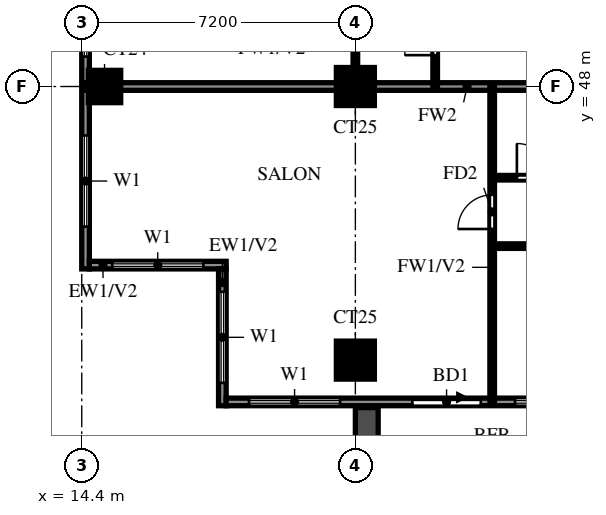
"""IFC4 building model, lengths in metres.
Left out: names, types, materials, properties, quantities, classifications, styles, units other than length and angle.
Written with IfcOpenShell. Run it as: python <this file> out.ifc"""

import sys

from ifc_helpers import new_model, si_unit, direction, frame, frame_2d, origin, origin_2d, place, context, subcontext, project, spatial, rectangle, extrude, source, transform, mapped, element, fill, save


model = new_model("IFC4")
c1 = context("Model", 3, precision=1e-05, world=origin(), true_north=direction((0.0, 1.0)))
c2 = subcontext(c1, "Body", "Model", "MODEL_VIEW")
j1 = project(units=[si_unit("LENGTHUNIT", "METRE"), si_unit("PLANEANGLEUNIT", "RADIAN")], contexts=[c1])
p1 = place(None, origin())
s1 = spatial("IfcSite", under=j1, at=p1, CompositionType="ELEMENT")
p2 = place(p1, origin())
s2 = spatial("IfcBuilding", under=s1, at=p2, CompositionType="ELEMENT")
p3 = place(p2, frame((0.0, 0.0, 167.5)))
s3 = spatial("IfcBuildingStorey", under=s2, at=p3, CompositionType="ELEMENT", Elevation=167.5)
m1 = source(origin(), c2, "Body", "SweptSolid", [
    extrude(rectangle(XDim=1.0, YDim=1.0, at=origin_2d()), origin(), (0.0, 0.0, 1.0), 3.2),
])
p4 = place(p3, frame((21.6, 40.8, 0.0), z_axis=(0.0, 0.0, 1.0), x_axis=(1.0, 0.0, 0.0)))
e1 = element("IfcColumn", 1, at=p4, inside=s3, PredefinedType="COLUMN", context=c2, shape_type="MappedRepresentation", body=[
    mapped(m1, transform((0.0, 0.0, 0.0))),
])
m2 = source(origin(), c2, "Body", "SweptSolid", [
    extrude(rectangle(XDim=0.85, YDim=0.85, at=origin_2d()), origin(), (0.0, 0.0, 1.0), 3.2),
])
p5 = place(p3, frame((15.0, 48.0, 0.0), z_axis=(0.0, 0.0, 1.0), x_axis=(1.0, 0.0, 0.0)))
e2 = element("IfcColumn", 2, at=p5, inside=s3, PredefinedType="COLUMN", context=c2, shape_type="MappedRepresentation", body=[
    mapped(m2, transform((0.0, 0.0, 0.0))),
])
p6 = place(p3, frame((21.6, 48.0, 0.0), z_axis=(0.0, 0.0, 1.0), x_axis=(1.0, 0.0, 0.0)))
e3 = element("IfcColumn", 3, at=p6, inside=s3, PredefinedType="COLUMN", context=c2, shape_type="MappedRepresentation", body=[
    mapped(m1, transform((0.0, 0.0, 0.0))),
])
p7 = place(p3, frame((14.5, 76.6, 0.0), z_axis=(0.0, 0.0, 1.0), x_axis=(0.0, -1.0, 0.0)))
e4 = element("IfcWall", 4, at=p7, inside=s3, PredefinedType="SOLIDWALL", context=c2, shape_type="SweptSolid", body=[
    extrude(rectangle(XDim=33.4, YDim=0.2, at=frame_2d((16.7, 0.0))), origin(), (0.0, 0.0, 1.0), 3.2),
])
p8 = place(p7, frame((15.1, 0.0, 0.0)))
e5 = element("IfcOpeningElement", 5, at=p8, cuts=e4, PredefinedType="OPENING", context=c2, shape_type="SweptSolid", body=[
    extrude(rectangle(XDim=1.8, YDim=2.4, at=frame_2d((0.9, 1.2))), frame((0.0, 0.11, 0.0), z_axis=(0.0, -1.0, 0.0), x_axis=(1.0, 0.0, 0.0)), (0.0, 0.0, 1.0), 0.22),
])
p9 = place(p7, frame((29.887, 0.0, 0.6)))
e6 = element("IfcOpeningElement", 6, at=p9, cuts=e4, PredefinedType="OPENING", context=c2, shape_type="SweptSolid", body=[
    extrude(rectangle(XDim=2.4, YDim=2.4, at=frame_2d((1.2, 1.2))), frame((0.0, 0.11, 0.0), z_axis=(0.0, -1.0, 0.0), x_axis=(1.0, 0.0, 0.0)), (0.0, 0.0, 1.0), 0.22),
])
p10 = place(p7, frame((25.413, 0.0, 0.6)))
e7 = element("IfcOpeningElement", 7, at=p10, cuts=e4, PredefinedType="OPENING", context=c2, shape_type="SweptSolid", body=[
    extrude(rectangle(XDim=2.4, YDim=2.4, at=frame_2d((1.2, 1.2))), frame((0.0, 0.11, 0.0), z_axis=(0.0, -1.0, 0.0), x_axis=(1.0, 0.0, 0.0)), (0.0, 0.0, 1.0), 0.22),
])
p11 = place(p7, frame((22.938, 0.0, 1.5)))
e8 = element("IfcOpeningElement", 8, at=p11, cuts=e4, PredefinedType="OPENING", context=c2, shape_type="SweptSolid", body=[
    extrude(rectangle(XDim=0.9, YDim=0.9, at=frame_2d((0.45, 0.45))), frame((0.0, 0.11, 0.0), z_axis=(0.0, -1.0, 0.0), x_axis=(1.0, 0.0, 0.0)), (0.0, 0.0, 1.0), 0.22),
])
p12 = place(p7, frame((17.35, 0.0, 0.6)))
e9 = element("IfcOpeningElement", 9, at=p12, cuts=e4, PredefinedType="OPENING", context=c2, shape_type="SweptSolid", body=[
    extrude(rectangle(XDim=0.9, YDim=2.4, at=frame_2d((0.45, 1.2))), frame((0.0, 0.11, 0.0), z_axis=(0.0, -1.0, 0.0), x_axis=(1.0, 0.0, 0.0)), (0.0, 0.0, 1.0), 0.22),
])
p13 = place(p7, frame((19.113, 0.0, 0.6)))
e10 = element("IfcOpeningElement", 10, at=p13, cuts=e4, PredefinedType="OPENING", context=c2, shape_type="SweptSolid", body=[
    extrude(rectangle(XDim=1.8, YDim=2.4, at=frame_2d((0.9, 1.2))), frame((0.0, 0.11, 0.0), z_axis=(0.0, -1.0, 0.0), x_axis=(1.0, 0.0, 0.0)), (0.0, 0.0, 1.0), 0.22),
])
p14 = place(p7, frame((10.75, 0.0, 0.6)))
e11 = element("IfcOpeningElement", 11, at=p14, cuts=e4, PredefinedType="OPENING", context=c2, shape_type="SweptSolid", body=[
    extrude(rectangle(XDim=0.9, YDim=2.4, at=frame_2d((0.45, 1.2))), frame((0.0, 0.11, 0.0), z_axis=(0.0, -1.0, 0.0), x_axis=(1.0, 0.0, 0.0)), (0.0, 0.0, 1.0), 0.22),
])
p15 = place(p7, frame((12.512, 0.0, 0.6)))
e12 = element("IfcOpeningElement", 12, at=p15, cuts=e4, PredefinedType="OPENING", context=c2, shape_type="SweptSolid", body=[
    extrude(rectangle(XDim=1.2, YDim=2.4, at=frame_2d((0.6, 1.2))), frame((0.0, 0.11, 0.0), z_axis=(0.0, -1.0, 0.0), x_axis=(1.0, 0.0, 0.0)), (0.0, 0.0, 1.0), 0.22),
])
p16 = place(p7, frame((8.538, 0.0, 1.5)))
e13 = element("IfcOpeningElement", 13, at=p16, cuts=e4, PredefinedType="OPENING", context=c2, shape_type="SweptSolid", body=[
    extrude(rectangle(XDim=0.9, YDim=0.9, at=frame_2d((0.45, 0.45))), frame((0.0, 0.11, 0.0), z_axis=(0.0, -1.0, 0.0), x_axis=(1.0, 0.0, 0.0)), (0.0, 0.0, 1.0), 0.22),
])
p17 = place(p7, frame((3.812, 0.0, 0.6)))
e14 = element("IfcOpeningElement", 14, at=p17, cuts=e4, PredefinedType="OPENING", context=c2, shape_type="SweptSolid", body=[
    extrude(rectangle(XDim=2.4, YDim=2.4, at=frame_2d((1.2, 1.2))), frame((0.0, 0.11, 0.0), z_axis=(0.0, -1.0, 0.0), x_axis=(1.0, 0.0, 0.0)), (0.0, 0.0, 1.0), 0.22),
])
p18 = place(p7, frame((0.6, 0.0, 0.6)))
e15 = element("IfcOpeningElement", 15, at=p18, cuts=e4, PredefinedType="OPENING", context=c2, shape_type="SweptSolid", body=[
    extrude(rectangle(XDim=2.4, YDim=2.4, at=frame_2d((1.2, 1.2))), frame((0.0, 0.11, 0.0), z_axis=(0.0, -1.0, 0.0), x_axis=(1.0, 0.0, 0.0)), (0.0, 0.0, 1.0), 0.22),
])
p19 = place(p3, frame((14.6, 43.3, 0.0), z_axis=(0.0, 0.0, 1.0), x_axis=(1.0, 0.0, 0.0)))
e16 = element("IfcWall", 16, at=p19, inside=s3, PredefinedType="SOLIDWALL", context=c2, shape_type="SweptSolid", body=[
    extrude(rectangle(XDim=3.6, YDim=0.2, at=frame_2d((1.8, 0.0))), origin(), (0.0, 0.0, 1.0), 3.2),
])
p20 = place(p19, frame((0.6, 0.0, 0.6)))
e17 = element("IfcOpeningElement", 17, at=p20, cuts=e16, PredefinedType="OPENING", context=c2, shape_type="SweptSolid", body=[
    extrude(rectangle(XDim=2.4, YDim=2.4, at=frame_2d((1.2, 1.2))), frame((0.0, 0.11, 0.0), z_axis=(0.0, -1.0, 0.0), x_axis=(1.0, 0.0, 0.0)), (0.0, 0.0, 1.0), 0.22),
])
p21 = place(p3, frame((18.1, 43.2, 0.0), z_axis=(0.0, 0.0, 1.0), x_axis=(0.0, -1.0, 0.0)))
e18 = element("IfcWall", 18, at=p21, inside=s3, PredefinedType="SOLIDWALL", context=c2, shape_type="SweptSolid", body=[
    extrude(rectangle(XDim=3.6, YDim=0.2, at=frame_2d((1.8, 0.0))), origin(), (0.0, 0.0, 1.0), 3.2),
])
p22 = place(p21, frame((0.6, 0.0, 0.6)))
e19 = element("IfcOpeningElement", 19, at=p22, cuts=e18, PredefinedType="OPENING", context=c2, shape_type="SweptSolid", body=[
    extrude(rectangle(XDim=2.4, YDim=2.4, at=frame_2d((1.2, 1.2))), frame((0.0, 0.11, 0.0), z_axis=(0.0, -1.0, 0.0), x_axis=(1.0, 0.0, 0.0)), (0.0, 0.0, 1.0), 0.22),
])
p23 = place(p3, frame((18.2, 39.7, 0.0), z_axis=(0.0, 0.0, 1.0), x_axis=(1.0, 0.0, 0.0)))
e20 = element("IfcWall", 20, at=p23, inside=s3, PredefinedType="SOLIDWALL", context=c2, shape_type="SweptSolid", body=[
    extrude(rectangle(XDim=23.8, YDim=0.2, at=frame_2d((11.9, 0.0))), origin(), (0.0, 0.0, 1.0), 3.2),
])
p24 = place(p23, frame((4.9, 0.0, 0.0)))
e21 = element("IfcOpeningElement", 21, at=p24, cuts=e20, PredefinedType="OPENING", context=c2, shape_type="SweptSolid", body=[
    extrude(rectangle(XDim=1.8, YDim=2.4, at=frame_2d((0.9, 1.2))), frame((0.0, 0.11, 0.0), z_axis=(0.0, -1.0, 0.0), x_axis=(1.0, 0.0, 0.0)), (0.0, 0.0, 1.0), 0.22),
])
p25 = place(p23, frame((0.6, 0.0, 0.6)))
e22 = element("IfcOpeningElement", 22, at=p25, cuts=e20, PredefinedType="OPENING", context=c2, shape_type="SweptSolid", body=[
    extrude(rectangle(XDim=2.4, YDim=2.4, at=frame_2d((1.2, 1.2))), frame((0.0, 0.11, 0.0), z_axis=(0.0, -1.0, 0.0), x_axis=(1.0, 0.0, 0.0)), (0.0, 0.0, 1.0), 0.22),
])
p26 = place(p23, frame((7.6, 0.0, 0.6)))
e23 = element("IfcOpeningElement", 23, at=p26, cuts=e20, PredefinedType="OPENING", context=c2, shape_type="SweptSolid", body=[
    extrude(rectangle(XDim=1.8, YDim=2.4, at=frame_2d((0.9, 1.2))), frame((0.0, 0.11, 0.0), z_axis=(0.0, -1.0, 0.0), x_axis=(1.0, 0.0, 0.0)), (0.0, 0.0, 1.0), 0.22),
])
p27 = place(p23, frame((11.8, 0.0, 0.6)))
e24 = element("IfcOpeningElement", 24, at=p27, cuts=e20, PredefinedType="OPENING", context=c2, shape_type="SweptSolid", body=[
    extrude(rectangle(XDim=2.4, YDim=2.4, at=frame_2d((1.2, 1.2))), frame((0.0, 0.11, 0.0), z_axis=(0.0, -1.0, 0.0), x_axis=(1.0, 0.0, 0.0)), (0.0, 0.0, 1.0), 0.22),
])
p28 = place(p3, frame((21.9, 39.55, 0.0), z_axis=(0.0, 0.0, 1.0), x_axis=(0.0, -1.0, 0.0)))
e25 = element("IfcWall", 25, at=p28, inside=s3, PredefinedType="SOLIDWALL", context=c2, shape_type="SweptSolid", body=[
    extrude(rectangle(XDim=2.65, YDim=0.6, at=frame_2d((1.325, 0.0))), origin(), (0.0, 0.0, 1.0), 2.85),
])
p29 = place(p3, frame((14.525, 48.0, 0.0), z_axis=(0.0, 0.0, 1.0), x_axis=(1.0, 0.0, 0.0)))
e26 = element("IfcWall", 26, at=p29, inside=s3, PredefinedType="SOLIDWALL", context=c2, shape_type="SweptSolid", body=[
    extrude(rectangle(XDim=19.075, YDim=0.2, at=frame_2d((9.538, 0.0))), origin(), (0.0, 0.0, 1.0), 3.2),
])
p30 = place(p3, frame((25.2, 43.8, 0.0), z_axis=(0.0, 0.0, 1.0), x_axis=(1.0, 0.0, 0.0)))
e27 = element("IfcWall", 27, at=p30, inside=s3, PredefinedType="PARTITIONING", context=c2, shape_type="SweptSolid", body=[
    extrude(rectangle(XDim=8.4, YDim=0.12, at=frame_2d((4.2, 0.0))), origin(), (0.0, 0.0, 1.0), 3.2),
])
p31 = place(p30, frame((1.35, 0.0, 0.0)))
e28 = element("IfcOpeningElement", 28, at=p31, cuts=e27, PredefinedType="OPENING", context=c2, shape_type="SweptSolid", body=[
    extrude(rectangle(XDim=0.9, YDim=2.1, at=frame_2d((0.45, 1.05))), frame((0.0, 0.07, 0.0), z_axis=(0.0, -1.0, 0.0), x_axis=(1.0, 0.0, 0.0)), (0.0, 0.0, 1.0), 0.14),
])
p32 = place(p30, frame((5.55, 0.0, 0.0)))
e29 = element("IfcOpeningElement", 29, at=p32, cuts=e27, PredefinedType="OPENING", context=c2, shape_type="SweptSolid", body=[
    extrude(rectangle(XDim=0.9, YDim=2.1, at=frame_2d((0.45, 1.05))), frame((0.0, 0.07, 0.0), z_axis=(0.0, -1.0, 0.0), x_axis=(1.0, 0.0, 0.0)), (0.0, 0.0, 1.0), 0.14),
])
p33 = place(p3, frame((25.2, 45.6, 0.0), z_axis=(0.0, 0.0, 1.0), x_axis=(1.0, 0.0, 0.0)))
e30 = element("IfcWall", 30, at=p33, inside=s3, PredefinedType="PARTITIONING", context=c2, shape_type="SweptSolid", body=[
    extrude(rectangle(XDim=6.0, YDim=0.12, at=frame_2d((3.0, 0.0))), origin(), (0.0, 0.0, 1.0), 3.2),
])
p34 = place(p33, frame((0.65, 0.0, 0.0)))
e31 = element("IfcOpeningElement", 31, at=p34, cuts=e30, PredefinedType="OPENING", context=c2, shape_type="SweptSolid", body=[
    extrude(rectangle(XDim=0.9, YDim=2.1, at=frame_2d((0.45, 1.05))), frame((0.0, 0.07, 0.0), z_axis=(0.0, -1.0, 0.0), x_axis=(1.0, 0.0, 0.0)), (0.0, 0.0, 1.0), 0.14),
])
p35 = place(p33, frame((3.65, 0.0, 0.0)))
e32 = element("IfcOpeningElement", 32, at=p35, cuts=e30, PredefinedType="OPENING", context=c2, shape_type="SweptSolid", body=[
    extrude(rectangle(XDim=0.9, YDim=2.1, at=frame_2d((0.45, 1.05))), frame((0.0, 0.07, 0.0), z_axis=(0.0, -1.0, 0.0), x_axis=(1.0, 0.0, 0.0)), (0.0, 0.0, 1.0), 0.14),
])
p36 = place(p3, frame((21.6, 48.0, 0.0), z_axis=(0.0, 0.0, 1.0), x_axis=(0.0, 1.0, 0.0)))
e33 = element("IfcWall", 33, at=p36, inside=s3, PredefinedType="PARTITIONING", context=c2, shape_type="SweptSolid", body=[
    extrude(rectangle(XDim=3.6, YDim=0.12, at=frame_2d((1.8, 0.0))), origin(), (0.0, 0.0, 1.0), 3.2),
])
p37 = place(p36, frame((1.35, 0.0, 0.0)))
e34 = element("IfcOpeningElement", 34, at=p37, cuts=e33, PredefinedType="OPENING", context=c2, shape_type="SweptSolid", body=[
    extrude(rectangle(XDim=0.9, YDim=2.1, at=frame_2d((0.45, 1.05))), frame((0.0, 0.07, 0.0), z_axis=(0.0, -1.0, 0.0), x_axis=(1.0, 0.0, 0.0)), (0.0, 0.0, 1.0), 0.14),
])
p38 = place(p3, frame((23.7, 48.0, 0.0), z_axis=(0.0, 0.0, 1.0), x_axis=(0.0, 1.0, 0.0)))
e35 = element("IfcWall", 35, at=p38, inside=s3, PredefinedType="PARTITIONING", context=c2, shape_type="SweptSolid", body=[
    extrude(rectangle(XDim=6.0, YDim=0.12, at=frame_2d((3.0, 0.0))), origin(), (0.0, 0.0, 1.0), 3.2),
])
p39 = place(p38, frame((0.825, 0.0, 0.0)))
e36 = element("IfcOpeningElement", 36, at=p39, cuts=e35, PredefinedType="OPENING", context=c2, shape_type="SweptSolid", body=[
    extrude(rectangle(XDim=0.8, YDim=2.1, at=frame_2d((0.4, 1.05))), frame((0.0, 0.07, 0.0), z_axis=(0.0, -1.0, 0.0), x_axis=(1.0, 0.0, 0.0)), (0.0, 0.0, 1.0), 0.14),
])
p40 = place(p3, frame((25.2, 39.725, 0.0), z_axis=(0.0, 0.0, 1.0), x_axis=(0.0, 1.0, 0.0)))
e37 = element("IfcWall", 37, at=p40, inside=s3, PredefinedType="PARTITIONING", context=c2, shape_type="SweptSolid", body=[
    extrude(rectangle(XDim=8.275, YDim=0.12, at=frame_2d((4.137, 0.0))), origin(), (0.0, 0.0, 1.0), 3.2),
])
p41 = place(p40, frame((4.525, 0.0, 0.0)))
e38 = element("IfcOpeningElement", 38, at=p41, cuts=e37, PredefinedType="OPENING", context=c2, shape_type="SweptSolid", body=[
    extrude(rectangle(XDim=0.9, YDim=2.1, at=frame_2d((0.45, 1.05))), frame((0.0, 0.07, 0.0), z_axis=(0.0, -1.0, 0.0), x_axis=(1.0, 0.0, 0.0)), (0.0, 0.0, 1.0), 0.14),
])
p42 = place(p9, origin())
e39 = element("IfcWindow", 39, at=p42, inside=s3, PartitioningType="DOUBLE_PANEL_VERTICAL", PredefinedType="WINDOW", context=c2, shape_type="SweptSolid", body=[
    extrude(rectangle(XDim=2.4, YDim=2.4, at=frame_2d((1.2, 1.2))), frame((0.0, 0.03, 0.0), z_axis=(0.0, -1.0, 0.0), x_axis=(1.0, 0.0, 0.0)), (0.0, 0.0, 1.0), 0.06),
])
fill(e6, e39)
p43 = place(p10, origin())
e40 = element("IfcWindow", 40, at=p43, inside=s3, PartitioningType="DOUBLE_PANEL_VERTICAL", PredefinedType="WINDOW", context=c2, shape_type="SweptSolid", body=[
    extrude(rectangle(XDim=2.4, YDim=2.4, at=frame_2d((1.2, 1.2))), frame((0.0, 0.03, 0.0), z_axis=(0.0, -1.0, 0.0), x_axis=(1.0, 0.0, 0.0)), (0.0, 0.0, 1.0), 0.06),
])
fill(e7, e40)
p44 = place(p20, origin())
e41 = element("IfcWindow", 41, at=p44, inside=s3, PartitioningType="DOUBLE_PANEL_VERTICAL", PredefinedType="WINDOW", context=c2, shape_type="SweptSolid", body=[
    extrude(rectangle(XDim=2.4, YDim=2.4, at=frame_2d((1.2, 1.2))), frame((0.0, 0.03, 0.0), z_axis=(0.0, -1.0, 0.0), x_axis=(1.0, 0.0, 0.0)), (0.0, 0.0, 1.0), 0.06),
])
fill(e17, e41)
p45 = place(p22, origin())
e42 = element("IfcWindow", 42, at=p45, inside=s3, PartitioningType="DOUBLE_PANEL_VERTICAL", PredefinedType="WINDOW", context=c2, shape_type="SweptSolid", body=[
    extrude(rectangle(XDim=2.4, YDim=2.4, at=frame_2d((1.2, 1.2))), frame((0.0, 0.03, 0.0), z_axis=(0.0, -1.0, 0.0), x_axis=(1.0, 0.0, 0.0)), (0.0, 0.0, 1.0), 0.06),
])
fill(e19, e42)
p46 = place(p24, origin())
e43 = element("IfcDoor", 43, at=p46, inside=s3, OperationType="DOUBLE_DOOR_SLIDING", PredefinedType="DOOR", context=c2, shape_type="SweptSolid", body=[
    extrude(rectangle(XDim=1.8, YDim=2.4, at=frame_2d((0.9, 1.2))), frame((0.0, 0.025, 0.0), z_axis=(0.0, -1.0, 0.0), x_axis=(1.0, 0.0, 0.0)), (0.0, 0.0, 1.0), 0.05),
])
fill(e21, e43)
p47 = place(p25, origin())
e44 = element("IfcWindow", 44, at=p47, inside=s3, PartitioningType="DOUBLE_PANEL_VERTICAL", PredefinedType="WINDOW", context=c2, shape_type="SweptSolid", body=[
    extrude(rectangle(XDim=2.4, YDim=2.4, at=frame_2d((1.2, 1.2))), frame((0.0, 0.03, 0.0), z_axis=(0.0, -1.0, 0.0), x_axis=(1.0, 0.0, 0.0)), (0.0, 0.0, 1.0), 0.06),
])
fill(e22, e44)
p48 = place(p26, origin())
e45 = element("IfcWindow", 45, at=p48, inside=s3, PartitioningType="DOUBLE_PANEL_VERTICAL", PredefinedType="WINDOW", context=c2, shape_type="SweptSolid", body=[
    extrude(rectangle(XDim=1.8, YDim=2.4, at=frame_2d((0.9, 1.2))), frame((0.0, 0.03, 0.0), z_axis=(0.0, -1.0, 0.0), x_axis=(1.0, 0.0, 0.0)), (0.0, 0.0, 1.0), 0.06),
])
fill(e23, e45)
p49 = place(p41, origin())
e46 = element("IfcDoor", 46, at=p49, inside=s3, OperationType="SINGLE_SWING_RIGHT", PredefinedType="DOOR", context=c2, shape_type="SweptSolid", body=[
    extrude(rectangle(XDim=0.9, YDim=2.1, at=frame_2d((0.45, 1.05))), frame((0.0, 0.025, 0.0), z_axis=(0.0, -1.0, 0.0), x_axis=(1.0, 0.0, 0.0)), (0.0, 0.0, 1.0), 0.05),
])
fill(e38, e46)
p50 = place(p34, origin())
e47 = element("IfcDoor", 47, at=p50, inside=s3, OperationType="SINGLE_SWING_RIGHT", PredefinedType="DOOR", context=c2, shape_type="SweptSolid", body=[
    extrude(rectangle(XDim=0.9, YDim=2.1, at=frame_2d((0.45, 1.05))), frame((0.0, 0.025, 0.0), z_axis=(0.0, -1.0, 0.0), x_axis=(1.0, 0.0, 0.0)), (0.0, 0.0, 1.0), 0.05),
])
fill(e31, e47)
p51 = place(p39, origin())
e48 = element("IfcDoor", 48, at=p51, inside=s3, OperationType="SINGLE_SWING_LEFT", PredefinedType="DOOR", context=c2, shape_type="SweptSolid", body=[
    extrude(rectangle(XDim=0.8, YDim=2.1, at=frame_2d((0.4, 1.05))), frame((0.0, 0.025, 0.0), z_axis=(0.0, -1.0, 0.0), x_axis=(1.0, 0.0, 0.0)), (0.0, 0.0, 1.0), 0.05),
])
fill(e36, e48)
save(model, sys.argv[1])
